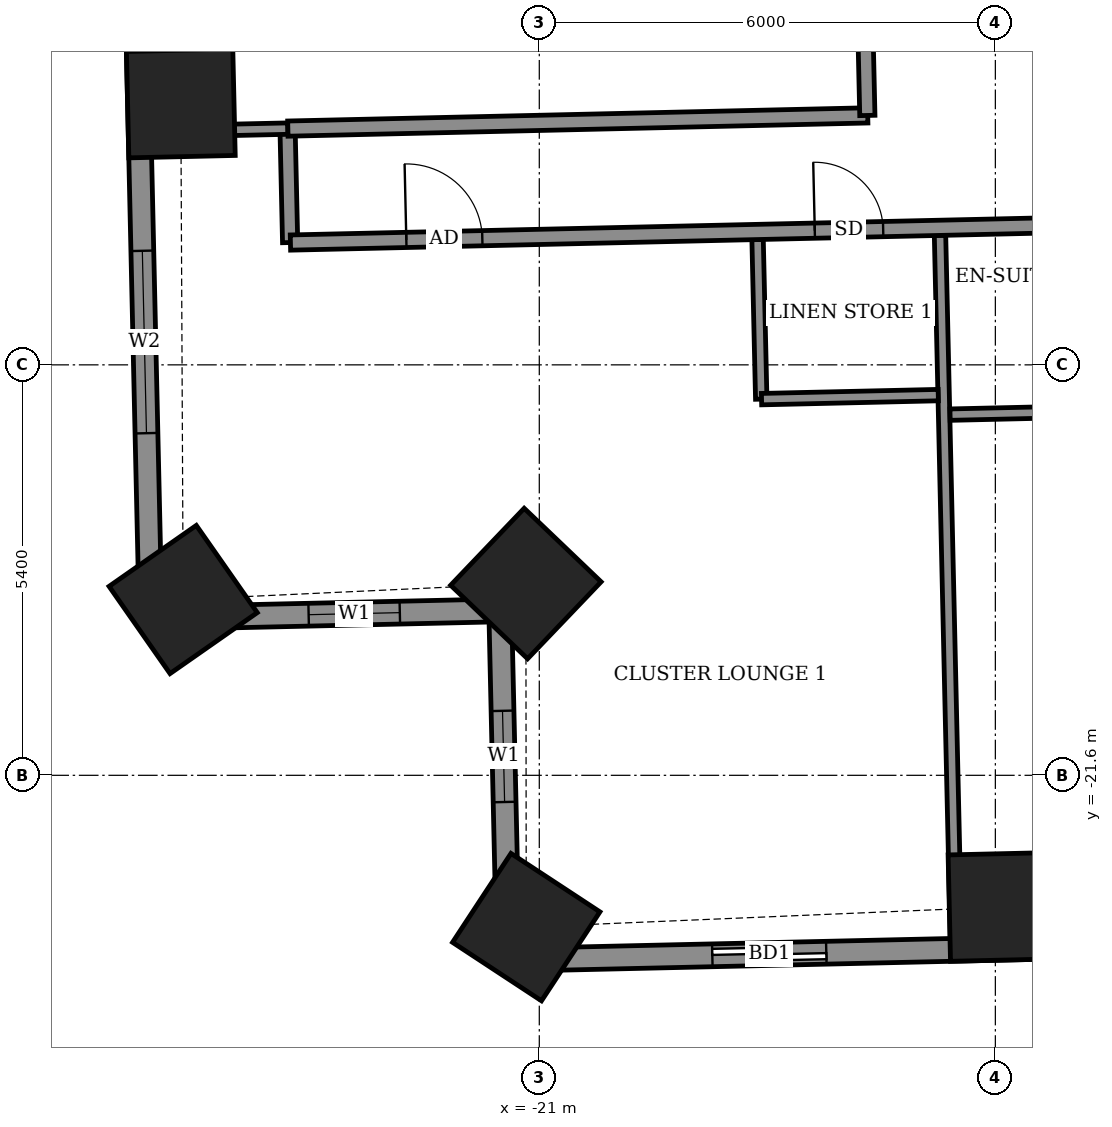
"""IFC4 building model, lengths in metres.
Left out: names, types, materials, properties, quantities, classifications, styles, units other than length and angle.
Written with IfcOpenShell. Run it as: python <this file> out.ifc"""

import sys

from ifc_helpers import new_model, si_unit, direction, frame, frame_2d, origin, origin_2d, place, context, subcontext, project, spatial, rectangle, extrude, element, fill, save


model = new_model("IFC4")
c1 = context("Model", 3, precision=1e-05, world=origin(), true_north=direction((0.0, 1.0)))
c2 = subcontext(c1, "Body", "Model", "MODEL_VIEW")
j1 = project(units=[si_unit("LENGTHUNIT", "METRE"), si_unit("PLANEANGLEUNIT", "RADIAN")], contexts=[c1])
p1 = place(None, origin())
s1 = spatial("IfcSite", under=j1, at=p1, CompositionType="ELEMENT")
p2 = place(p1, origin())
s2 = spatial("IfcBuilding", under=s1, at=p2, CompositionType="ELEMENT")
p3 = place(p2, frame((0.0, 0.0, 93.7)))
s3 = spatial("IfcBuildingStorey", under=s2, at=p3, CompositionType="ELEMENT", Elevation=93.7)
for number, where, z_axis, x_axis in (
    (1, (-25.716, -12.761, -0.55), (0.0, 0.0, 1.0), (0.023, -1.0, 0.0)),
    (2, (-25.685, -19.287, -0.55), (0.0, 0.0, 1.0), (0.573, -0.82, 0.0)),
    (3, (-21.177, -19.077, -0.55), (0.0, 0.0, 1.0), (0.723, -0.691, 0.0)),
    (4, (-21.172, -23.597, -0.55), (0.0, 0.0, 1.0), (0.836, -0.549, 0.0)),
    (5, (-14.906, -23.331, -0.55), (0.0, 0.0, 1.0), (1.0, 0.023, 0.0)),
):
    element("IfcColumn", number, at=place(p3, frame(where, z_axis=z_axis, x_axis=x_axis)), inside=s3, PredefinedType="COLUMN", context=c2, shape_type="SweptSolid", body=[
        extrude(rectangle(XDim=1.4, YDim=1.4, at=origin_2d()), origin(), (0.0, 0.0, 1.0), 3.6),
    ])
p4 = place(p3, frame((-26.424, -5.808, 0.0), z_axis=(0.0, 0.0, 1.0), x_axis=(0.022654755793, -0.999743348085, 0.0)))
e6 = element("IfcWall", 6, at=p4, inside=s3, PredefinedType="SOLIDWALL", context=c2, shape_type="SweptSolid", body=[
    extrude(rectangle(XDim=13.729, YDim=0.3, at=frame_2d((6.865, 0.0))), origin(), (0.0, 0.0, 1.0), 3.05),
])
p5 = place(p4, frame((2.761, 0.0, 0.0)))
e7 = element("IfcOpeningElement", 7, at=p5, cuts=e6, PredefinedType="OPENING", context=c2, shape_type="SweptSolid", body=[
    extrude(rectangle(XDim=1.5, YDim=2.4, at=frame_2d((0.75, 1.2))), frame((0.0, 0.16, 0.0), z_axis=(0.0, -1.0, 0.0), x_axis=(1.0, 0.0, 0.0)), (0.0, 0.0, 1.0), 0.32),
])
p6 = place(p4, frame((8.894, 0.0, 0.9)))
e8 = element("IfcOpeningElement", 8, at=p6, cuts=e6, PredefinedType="OPENING", context=c2, shape_type="SweptSolid", body=[
    extrude(rectangle(XDim=2.4, YDim=1.5, at=frame_2d((1.2, 0.75))), frame((0.0, 0.16, 0.0), z_axis=(0.0, -1.0, 0.0), x_axis=(1.0, 0.0, 0.0)), (0.0, 0.0, 1.0), 0.32),
])
p7 = place(p3, frame((-26.113, -19.534, 0.0), z_axis=(0.0, 0.0, 1.0), x_axis=(0.999744404568, 0.02260808559, 0.0)))
e9 = element("IfcWall", 9, at=p7, inside=s3, PredefinedType="SOLIDWALL", context=c2, shape_type="SweptSolid", body=[
    extrude(rectangle(XDim=4.6, YDim=0.3, at=frame_2d((2.3, 0.0))), origin(), (0.0, 0.0, 1.0), 2.55),
])
p8 = place(p7, frame((2.079, 0.0, 0.9)))
e10 = element("IfcOpeningElement", 10, at=p8, cuts=e9, PredefinedType="OPENING", context=c2, shape_type="SweptSolid", body=[
    extrude(rectangle(XDim=1.2, YDim=1.5, at=frame_2d((0.6, 0.75))), frame((0.0, 0.16, 0.0), z_axis=(0.0, -1.0, 0.0), x_axis=(1.0, 0.0, 0.0)), (0.0, 0.0, 1.0), 0.32),
])
p9 = place(p3, frame((-21.514, -19.43, 0.0), z_axis=(0.0, 0.0, 1.0), x_axis=(0.022820258049, -0.999739584003, 0.0)))
e11 = element("IfcWall", 11, at=p9, inside=s3, PredefinedType="SOLIDWALL", context=c2, shape_type="SweptSolid", body=[
    extrude(rectangle(XDim=4.6, YDim=0.3, at=frame_2d((2.3, 0.0))), origin(), (0.0, 0.0, 1.0), 2.55),
])
p10 = place(p9, frame((1.322, 0.0, 0.9)))
e12 = element("IfcOpeningElement", 12, at=p10, cuts=e11, PredefinedType="OPENING", context=c2, shape_type="SweptSolid", body=[
    extrude(rectangle(XDim=1.2, YDim=1.5, at=frame_2d((0.6, 0.75))), frame((0.0, 0.16, 0.0), z_axis=(0.0, -1.0, 0.0), x_axis=(1.0, 0.0, 0.0)), (0.0, 0.0, 1.0), 0.32),
])
p11 = place(p3, frame((-21.409, -24.029, 0.0), z_axis=(0.0, 0.0, 1.0), x_axis=(0.999742634032, 0.022686244721, 0.0)))
e13 = element("IfcWall", 13, at=p11, inside=s3, PredefinedType="SOLIDWALL", context=c2, shape_type="SweptSolid", body=[
    extrude(rectangle(XDim=46.372, YDim=0.3, at=frame_2d((23.186, 0.0))), origin(), (0.0, 0.0, 1.0), 3.05),
])
p12 = place(p11, frame((2.686, 0.0, 0.0)))
e14 = element("IfcOpeningElement", 14, at=p12, cuts=e13, PredefinedType="OPENING", context=c2, shape_type="SweptSolid", body=[
    extrude(rectangle(XDim=1.5, YDim=2.4, at=frame_2d((0.75, 1.2))), frame((0.0, 0.16, 0.0), z_axis=(0.0, -1.0, 0.0), x_axis=(1.0, 0.0, 0.0)), (0.0, 0.0, 1.0), 0.32),
])
p13 = place(p11, frame((7.959, 0.0, 0.0)))
e15 = element("IfcOpeningElement", 15, at=p13, cuts=e13, PredefinedType="OPENING", context=c2, shape_type="SweptSolid", body=[
    extrude(rectangle(XDim=1.5, YDim=2.4, at=frame_2d((0.75, 1.2))), frame((0.0, 0.16, 0.0), z_axis=(0.0, -1.0, 0.0), x_axis=(1.0, 0.0, 0.0)), (0.0, 0.0, 1.0), 0.32),
])
p14 = place(p11, frame((10.842, 0.0, 0.0)))
e16 = element("IfcOpeningElement", 16, at=p14, cuts=e13, PredefinedType="OPENING", context=c2, shape_type="SweptSolid", body=[
    extrude(rectangle(XDim=1.5, YDim=2.4, at=frame_2d((0.75, 1.2))), frame((0.0, 0.16, 0.0), z_axis=(0.0, -1.0, 0.0), x_axis=(1.0, 0.0, 0.0)), (0.0, 0.0, 1.0), 0.32),
])
p15 = place(p11, frame((16.3, 0.0, 0.0)))
e17 = element("IfcOpeningElement", 17, at=p15, cuts=e13, PredefinedType="OPENING", context=c2, shape_type="SweptSolid", body=[
    extrude(rectangle(XDim=1.5, YDim=2.4, at=frame_2d((0.75, 1.2))), frame((0.0, 0.16, 0.0), z_axis=(0.0, -1.0, 0.0), x_axis=(1.0, 0.0, 0.0)), (0.0, 0.0, 1.0), 0.32),
])
p16 = place(p11, frame((21.326, 0.0, 0.0)))
e18 = element("IfcOpeningElement", 18, at=p16, cuts=e13, PredefinedType="OPENING", context=c2, shape_type="SweptSolid", body=[
    extrude(rectangle(XDim=1.5, YDim=2.4, at=frame_2d((0.75, 1.2))), frame((0.0, 0.16, 0.0), z_axis=(0.0, -1.0, 0.0), x_axis=(1.0, 0.0, 0.0)), (0.0, 0.0, 1.0), 0.32),
])
p17 = place(p11, frame((24.21, 0.0, 0.0)))
e19 = element("IfcOpeningElement", 19, at=p17, cuts=e13, PredefinedType="OPENING", context=c2, shape_type="SweptSolid", body=[
    extrude(rectangle(XDim=1.5, YDim=2.4, at=frame_2d((0.75, 1.2))), frame((0.0, 0.16, 0.0), z_axis=(0.0, -1.0, 0.0), x_axis=(1.0, 0.0, 0.0)), (0.0, 0.0, 1.0), 0.32),
])
p18 = place(p11, frame((29.769, 0.0, 0.0)))
e20 = element("IfcOpeningElement", 20, at=p18, cuts=e13, PredefinedType="OPENING", context=c2, shape_type="SweptSolid", body=[
    extrude(rectangle(XDim=1.5, YDim=2.4, at=frame_2d((0.75, 1.2))), frame((0.0, 0.16, 0.0), z_axis=(0.0, -1.0, 0.0), x_axis=(1.0, 0.0, 0.0)), (0.0, 0.0, 1.0), 0.32),
])
p19 = place(p11, frame((34.819, 0.0, 0.0)))
e21 = element("IfcOpeningElement", 21, at=p19, cuts=e13, PredefinedType="OPENING", context=c2, shape_type="SweptSolid", body=[
    extrude(rectangle(XDim=1.5, YDim=2.4, at=frame_2d((0.75, 1.2))), frame((0.0, 0.16, 0.0), z_axis=(0.0, -1.0, 0.0), x_axis=(1.0, 0.0, 0.0)), (0.0, 0.0, 1.0), 0.32),
])
p20 = place(p11, frame((37.852, 0.0, 0.0)))
e22 = element("IfcOpeningElement", 22, at=p20, cuts=e13, PredefinedType="OPENING", context=c2, shape_type="SweptSolid", body=[
    extrude(rectangle(XDim=1.2, YDim=2.4, at=frame_2d((0.6, 1.2))), frame((0.0, 0.16, 0.0), z_axis=(0.0, -1.0, 0.0), x_axis=(1.0, 0.0, 0.0)), (0.0, 0.0, 1.0), 0.32),
])
p21 = place(p11, frame((42.373, 0.0, 0.9)))
e23 = element("IfcOpeningElement", 23, at=p21, cuts=e13, PredefinedType="OPENING", context=c2, shape_type="SweptSolid", body=[
    extrude(rectangle(XDim=2.4, YDim=1.5, at=frame_2d((1.2, 0.75))), frame((0.0, 0.16, 0.0), z_axis=(0.0, -1.0, 0.0), x_axis=(1.0, 0.0, 0.0)), (0.0, 0.0, 1.0), 0.32),
])
p22 = place(p3, frame((-15.518, -23.745, 0.0), z_axis=(0.0, 0.0, 1.0), x_axis=(-0.022697424684, 0.999742380272, 0.0)))
e24 = element("IfcWall", 24, at=p22, inside=s3, PredefinedType="PARTITIONING", context=c2, shape_type="SweptSolid", body=[
    extrude(rectangle(XDim=9.25, YDim=0.15, at=frame_2d((4.625, 0.0))), origin(), (0.0, 0.0, 1.0), 3.05),
])
p23 = place(p3, frame((-15.596, -16.855, 0.0), z_axis=(0.0, 0.0, 1.0), x_axis=(0.999740478815, 0.022781023197, 0.0)))
e25 = element("IfcWall", 25, at=p23, inside=s3, PredefinedType="PARTITIONING", context=c2, shape_type="SweptSolid", body=[
    extrude(rectangle(XDim=2.325, YDim=0.15, at=frame_2d((1.163, 0.0))), origin(), (0.0, 0.0, 1.0), 3.05),
])
p24 = place(p3, frame((-18.08, -16.651, 0.0), z_axis=(0.0, 0.0, 1.0), x_axis=(-0.022792727877, 0.999740212033, 0.0)))
e26 = element("IfcWall", 26, at=p24, inside=s3, PredefinedType="PARTITIONING", context=c2, shape_type="SweptSolid", body=[
    extrude(rectangle(XDim=2.099, YDim=0.15, at=frame_2d((1.05, 0.0))), origin(), (0.0, 0.0, 1.0), 3.05),
])
p25 = place(p3, frame((-18.076, -16.651, 0.0), z_axis=(0.0, 0.0, 1.0), x_axis=(0.999740478815, 0.022781023197, 0.0)))
e27 = element("IfcWall", 27, at=p25, inside=s3, PredefinedType="PARTITIONING", context=c2, shape_type="SweptSolid", body=[
    extrude(rectangle(XDim=2.325, YDim=0.15, at=frame_2d((1.163, 0.0))), origin(), (0.0, 0.0, 1.0), 3.05),
])
p26 = place(p3, frame((-24.278, -14.591, 0.0), z_axis=(0.0, 0.0, 1.0), x_axis=(-0.022632637625, 0.99974384905, 0.0)))
e28 = element("IfcWall", 28, at=p26, inside=s3, PredefinedType="PARTITIONING", context=c2, shape_type="SweptSolid", body=[
    extrude(rectangle(XDim=1.5, YDim=0.2, at=frame_2d((0.75, 0.0))), origin(), (0.0, 0.0, 1.0), 3.05),
])
p27 = place(p3, frame((-24.274, -14.591, 0.0), z_axis=(0.0, 0.0, 1.0), x_axis=(0.999742718753, 0.022682510909, 0.0)))
e29 = element("IfcWall", 29, at=p27, inside=s3, PredefinedType="PARTITIONING", context=c2, shape_type="SweptSolid", body=[
    extrude(rectangle(XDim=52.471, YDim=0.2, at=frame_2d((26.236, 0.0))), origin(), (0.0, 0.0, 1.0), 3.05),
])
p28 = place(p27, frame((1.525, 0.0, 0.0)))
e30 = element("IfcOpeningElement", 30, at=p28, cuts=e29, PredefinedType="OPENING", context=c2, shape_type="SweptSolid", body=[
    extrude(rectangle(XDim=1.0, YDim=2.1, at=frame_2d((0.5, 1.05))), frame((0.0, 0.11, 0.0), z_axis=(0.0, -1.0, 0.0), x_axis=(1.0, 0.0, 0.0)), (0.0, 0.0, 1.0), 0.22),
])
p29 = place(p27, frame((6.9, 0.0, 0.0)))
e31 = element("IfcOpeningElement", 31, at=p29, cuts=e29, PredefinedType="OPENING", context=c2, shape_type="SweptSolid", body=[
    extrude(rectangle(XDim=0.9, YDim=2.1, at=frame_2d((0.45, 1.05))), frame((0.0, 0.11, 0.0), z_axis=(0.0, -1.0, 0.0), x_axis=(1.0, 0.0, 0.0)), (0.0, 0.0, 1.0), 0.22),
])
p30 = place(p27, frame((11.575, 0.0, 0.0)))
e32 = element("IfcOpeningElement", 32, at=p30, cuts=e29, PredefinedType="OPENING", context=c2, shape_type="SweptSolid", body=[
    extrude(rectangle(XDim=0.9, YDim=2.1, at=frame_2d((0.45, 1.05))), frame((0.0, 0.11, 0.0), z_axis=(0.0, -1.0, 0.0), x_axis=(1.0, 0.0, 0.0)), (0.0, 0.0, 1.0), 0.22),
])
p31 = place(p27, frame((13.6, 0.0, 0.0)))
e33 = element("IfcOpeningElement", 33, at=p31, cuts=e29, PredefinedType="OPENING", context=c2, shape_type="SweptSolid", body=[
    extrude(rectangle(XDim=0.9, YDim=2.1, at=frame_2d((0.45, 1.05))), frame((0.0, 0.11, 0.0), z_axis=(0.0, -1.0, 0.0), x_axis=(1.0, 0.0, 0.0)), (0.0, 0.0, 1.0), 0.22),
])
p32 = place(p27, frame((20.45, 0.0, 0.0)))
e34 = element("IfcOpeningElement", 34, at=p32, cuts=e29, PredefinedType="OPENING", context=c2, shape_type="SweptSolid", body=[
    extrude(rectangle(XDim=0.9, YDim=2.1, at=frame_2d((0.45, 1.05))), frame((0.0, 0.11, 0.0), z_axis=(0.0, -1.0, 0.0), x_axis=(1.0, 0.0, 0.0)), (0.0, 0.0, 1.0), 0.22),
])
p33 = place(p27, frame((22.6, 0.0, 0.0)))
e35 = element("IfcOpeningElement", 35, at=p33, cuts=e29, PredefinedType="OPENING", context=c2, shape_type="SweptSolid", body=[
    extrude(rectangle(XDim=0.9, YDim=2.1, at=frame_2d((0.45, 1.05))), frame((0.0, 0.11, 0.0), z_axis=(0.0, -1.0, 0.0), x_axis=(1.0, 0.0, 0.0)), (0.0, 0.0, 1.0), 0.22),
])
p34 = place(p27, frame((29.475, 0.0, 0.0)))
e36 = element("IfcOpeningElement", 36, at=p34, cuts=e29, PredefinedType="OPENING", context=c2, shape_type="SweptSolid", body=[
    extrude(rectangle(XDim=0.9, YDim=2.1, at=frame_2d((0.45, 1.05))), frame((0.0, 0.11, 0.0), z_axis=(0.0, -1.0, 0.0), x_axis=(1.0, 0.0, 0.0)), (0.0, 0.0, 1.0), 0.22),
])
p35 = place(p27, frame((31.675, 0.0, 0.0)))
e37 = element("IfcOpeningElement", 37, at=p35, cuts=e29, PredefinedType="OPENING", context=c2, shape_type="SweptSolid", body=[
    extrude(rectangle(XDim=0.9, YDim=2.1, at=frame_2d((0.45, 1.05))), frame((0.0, 0.11, 0.0), z_axis=(0.0, -1.0, 0.0), x_axis=(1.0, 0.0, 0.0)), (0.0, 0.0, 1.0), 0.22),
])
p36 = place(p27, frame((38.675, 0.0, 0.0)))
e38 = element("IfcOpeningElement", 38, at=p36, cuts=e29, PredefinedType="OPENING", context=c2, shape_type="SweptSolid", body=[
    extrude(rectangle(XDim=0.9, YDim=2.1, at=frame_2d((0.45, 1.05))), frame((0.0, 0.11, 0.0), z_axis=(0.0, -1.0, 0.0), x_axis=(1.0, 0.0, 0.0)), (0.0, 0.0, 1.0), 0.22),
])
p37 = place(p27, frame((40.675, 0.0, 0.0)))
e39 = element("IfcOpeningElement", 39, at=p37, cuts=e29, PredefinedType="OPENING", context=c2, shape_type="SweptSolid", body=[
    extrude(rectangle(XDim=0.9, YDim=2.1, at=frame_2d((0.45, 1.05))), frame((0.0, 0.11, 0.0), z_axis=(0.0, -1.0, 0.0), x_axis=(1.0, 0.0, 0.0)), (0.0, 0.0, 1.0), 0.22),
])
p38 = place(p27, frame((50.436, 0.0, 0.0)))
e40 = element("IfcOpeningElement", 40, at=p38, cuts=e29, PredefinedType="OPENING", context=c2, shape_type="SweptSolid", body=[
    extrude(rectangle(XDim=1.0, YDim=2.1, at=frame_2d((0.5, 1.05))), frame((0.0, 0.11, 0.0), z_axis=(0.0, -1.0, 0.0), x_axis=(1.0, 0.0, 0.0)), (0.0, 0.0, 1.0), 0.22),
])
p39 = place(p27, frame((45.45, 0.0, 0.0)))
e41 = element("IfcOpeningElement", 41, at=p39, cuts=e29, PredefinedType="OPENING", context=c2, shape_type="SweptSolid", body=[
    extrude(rectangle(XDim=0.9, YDim=2.1, at=frame_2d((0.45, 1.05))), frame((0.0, 0.11, 0.0), z_axis=(0.0, -1.0, 0.0), x_axis=(1.0, 0.0, 0.0)), (0.0, 0.0, 1.0), 0.22),
])
p40 = place(p3, frame((-26.108, -13.132, 0.0), z_axis=(0.0, 0.0, 1.0), x_axis=(0.999752642043, 0.022240834685, 0.0)))
e42 = element("IfcWall", 42, at=p40, inside=s3, PredefinedType="PARTITIONING", context=c2, shape_type="SweptSolid", body=[
    extrude(rectangle(XDim=1.8, YDim=0.15, at=frame_2d((0.9, 0.0))), origin(), (0.0, 0.0, 1.0), 3.05),
])
p41 = place(p3, frame((-24.308, -13.092, 0.0), z_axis=(0.0, 0.0, 1.0), x_axis=(0.999739800004, 0.022810793222, 0.0)))
e43 = element("IfcWall", 43, at=p41, inside=s3, PredefinedType="PARTITIONING", context=c2, shape_type="SweptSolid", body=[
    extrude(rectangle(XDim=7.631, YDim=0.2, at=frame_2d((3.815, 0.0))), origin(), (0.0, 0.0, 1.0), 3.05),
])
p42 = place(p3, frame((-16.684, -12.919, 0.0), z_axis=(0.0, 0.0, 1.0), x_axis=(-0.022706151961, 0.999742182097, 0.0)))
e44 = element("IfcWall", 44, at=p42, inside=s3, PredefinedType="PARTITIONING", context=c2, shape_type="SweptSolid", body=[
    extrude(rectangle(XDim=25.45, YDim=0.2, at=frame_2d((12.725, 0.0))), origin(), (0.0, 0.0, 1.0), 3.05),
])
p43 = place(p42, frame((23.938, 0.0, 0.0)))
e45 = element("IfcOpeningElement", 45, at=p43, cuts=e44, PredefinedType="OPENING", context=c2, shape_type="SweptSolid", body=[
    extrude(rectangle(XDim=1.0, YDim=2.1, at=frame_2d((0.5, 1.05))), frame((0.0, 0.11, 0.0), z_axis=(0.0, -1.0, 0.0), x_axis=(1.0, 0.0, 0.0)), (0.0, 0.0, 1.0), 0.22),
])
p44 = place(p42, frame((21.775, 0.0, 0.0)))
e46 = element("IfcOpeningElement", 46, at=p44, cuts=e44, PredefinedType="OPENING", context=c2, shape_type="SweptSolid", body=[
    extrude(rectangle(XDim=0.9, YDim=2.1, at=frame_2d((0.45, 1.05))), frame((0.0, 0.11, 0.0), z_axis=(0.0, -1.0, 0.0), x_axis=(1.0, 0.0, 0.0)), (0.0, 0.0, 1.0), 0.22),
])
p45 = place(p42, frame((16.975, 0.0, 0.0)))
e47 = element("IfcOpeningElement", 47, at=p45, cuts=e44, PredefinedType="OPENING", context=c2, shape_type="SweptSolid", body=[
    extrude(rectangle(XDim=1.0, YDim=2.1, at=frame_2d((0.5, 1.05))), frame((0.0, 0.11, 0.0), z_axis=(0.0, -1.0, 0.0), x_axis=(1.0, 0.0, 0.0)), (0.0, 0.0, 1.0), 0.22),
])
p46 = place(p42, frame((19.275, 0.0, 0.0)))
e48 = element("IfcOpeningElement", 48, at=p46, cuts=e44, PredefinedType="OPENING", context=c2, shape_type="SweptSolid", body=[
    extrude(rectangle(XDim=0.9, YDim=2.1, at=frame_2d((0.45, 1.05))), frame((0.0, 0.11, 0.0), z_axis=(0.0, -1.0, 0.0), x_axis=(1.0, 0.0, 0.0)), (0.0, 0.0, 1.0), 0.22),
])
p47 = place(p42, frame((15.075, 0.0, 0.0)))
e49 = element("IfcOpeningElement", 49, at=p47, cuts=e44, PredefinedType="OPENING", context=c2, shape_type="SweptSolid", body=[
    extrude(rectangle(XDim=1.0, YDim=2.1, at=frame_2d((0.5, 1.05))), frame((0.0, 0.11, 0.0), z_axis=(0.0, -1.0, 0.0), x_axis=(1.0, 0.0, 0.0)), (0.0, 0.0, 1.0), 0.22),
])
p48 = place(p42, frame((12.975, 0.0, 0.0)))
e50 = element("IfcOpeningElement", 50, at=p48, cuts=e44, PredefinedType="OPENING", context=c2, shape_type="SweptSolid", body=[
    extrude(rectangle(XDim=0.9, YDim=2.1, at=frame_2d((0.45, 1.05))), frame((0.0, 0.11, 0.0), z_axis=(0.0, -1.0, 0.0), x_axis=(1.0, 0.0, 0.0)), (0.0, 0.0, 1.0), 0.22),
])
p49 = place(p42, frame((10.55, 0.0, 0.0)))
e51 = element("IfcOpeningElement", 51, at=p49, cuts=e44, PredefinedType="OPENING", context=c2, shape_type="SweptSolid", body=[
    extrude(rectangle(XDim=1.0, YDim=2.1, at=frame_2d((0.5, 1.05))), frame((0.0, 0.11, 0.0), z_axis=(0.0, -1.0, 0.0), x_axis=(1.0, 0.0, 0.0)), (0.0, 0.0, 1.0), 0.22),
])
p50 = place(p42, frame((8.125, 0.0, 0.0)))
e52 = element("IfcOpeningElement", 52, at=p50, cuts=e44, PredefinedType="OPENING", context=c2, shape_type="SweptSolid", body=[
    extrude(rectangle(XDim=0.9, YDim=2.1, at=frame_2d((0.45, 1.05))), frame((0.0, 0.11, 0.0), z_axis=(0.0, -1.0, 0.0), x_axis=(1.0, 0.0, 0.0)), (0.0, 0.0, 1.0), 0.22),
])
p51 = place(p42, frame((1.737, 0.0, 0.0)))
e53 = element("IfcOpeningElement", 53, at=p51, cuts=e44, PredefinedType="OPENING", context=c2, shape_type="SweptSolid", body=[
    extrude(rectangle(XDim=1.0, YDim=2.1, at=frame_2d((0.5, 1.05))), frame((0.0, 0.11, 0.0), z_axis=(0.0, -1.0, 0.0), x_axis=(1.0, 0.0, 0.0)), (0.0, 0.0, 1.0), 0.22),
])
p52 = place(p42, frame((5.425, 0.0, 0.0)))
e54 = element("IfcOpeningElement", 54, at=p52, cuts=e44, PredefinedType="OPENING", context=c2, shape_type="SweptSolid", body=[
    extrude(rectangle(XDim=0.9, YDim=2.1, at=frame_2d((0.45, 1.05))), frame((0.0, 0.11, 0.0), z_axis=(0.0, -1.0, 0.0), x_axis=(1.0, 0.0, 0.0)), (0.0, 0.0, 1.0), 0.22),
])
p53 = place(p6, origin())
e55 = element("IfcWindow", 55, at=p53, inside=s3, PartitioningType="DOUBLE_PANEL_VERTICAL", PredefinedType="WINDOW", context=c2, shape_type="SweptSolid", body=[
    extrude(rectangle(XDim=2.4, YDim=1.5, at=frame_2d((1.2, 0.75))), frame((0.0, 0.03, 0.0), z_axis=(0.0, -1.0, 0.0), x_axis=(1.0, 0.0, 0.0)), (0.0, 0.0, 1.0), 0.06),
])
fill(e8, e55)
p54 = place(p8, origin())
e56 = element("IfcWindow", 56, at=p54, inside=s3, PartitioningType="SINGLE_PANEL", PredefinedType="WINDOW", context=c2, shape_type="SweptSolid", body=[
    extrude(rectangle(XDim=1.2, YDim=1.5, at=frame_2d((0.6, 0.75))), frame((0.0, 0.03, 0.0), z_axis=(0.0, -1.0, 0.0), x_axis=(1.0, 0.0, 0.0)), (0.0, 0.0, 1.0), 0.06),
])
fill(e10, e56)
p55 = place(p10, origin())
e57 = element("IfcWindow", 57, at=p55, inside=s3, PartitioningType="SINGLE_PANEL", PredefinedType="WINDOW", context=c2, shape_type="SweptSolid", body=[
    extrude(rectangle(XDim=1.2, YDim=1.5, at=frame_2d((0.6, 0.75))), frame((0.0, 0.03, 0.0), z_axis=(0.0, -1.0, 0.0), x_axis=(1.0, 0.0, 0.0)), (0.0, 0.0, 1.0), 0.06),
])
fill(e12, e57)
p56 = place(p12, origin())
e58 = element("IfcDoor", 58, at=p56, inside=s3, OperationType="SLIDING_TO_LEFT", PredefinedType="DOOR", context=c2, shape_type="SweptSolid", body=[
    extrude(rectangle(XDim=1.5, YDim=2.4, at=frame_2d((0.75, 1.2))), frame((0.0, 0.025, 0.0), z_axis=(0.0, -1.0, 0.0), x_axis=(1.0, 0.0, 0.0)), (0.0, 0.0, 1.0), 0.05),
])
fill(e14, e58)
p57 = place(p28, origin())
e59 = element("IfcDoor", 59, at=p57, inside=s3, OperationType="SINGLE_SWING_LEFT", PredefinedType="DOOR", context=c2, shape_type="SweptSolid", body=[
    extrude(rectangle(XDim=1.0, YDim=2.1, at=frame_2d((0.5, 1.05))), frame((0.0, 0.025, 0.0), z_axis=(0.0, -1.0, 0.0), x_axis=(1.0, 0.0, 0.0)), (0.0, 0.0, 1.0), 0.05),
])
fill(e30, e59)
p58 = place(p29, origin())
e60 = element("IfcDoor", 60, at=p58, inside=s3, OperationType="SINGLE_SWING_LEFT", PredefinedType="DOOR", context=c2, shape_type="SweptSolid", body=[
    extrude(rectangle(XDim=0.9, YDim=2.1, at=frame_2d((0.45, 1.05))), frame((0.0, 0.025, 0.0), z_axis=(0.0, -1.0, 0.0), x_axis=(1.0, 0.0, 0.0)), (0.0, 0.0, 1.0), 0.05),
])
fill(e31, e60)
save(model, sys.argv[1])
